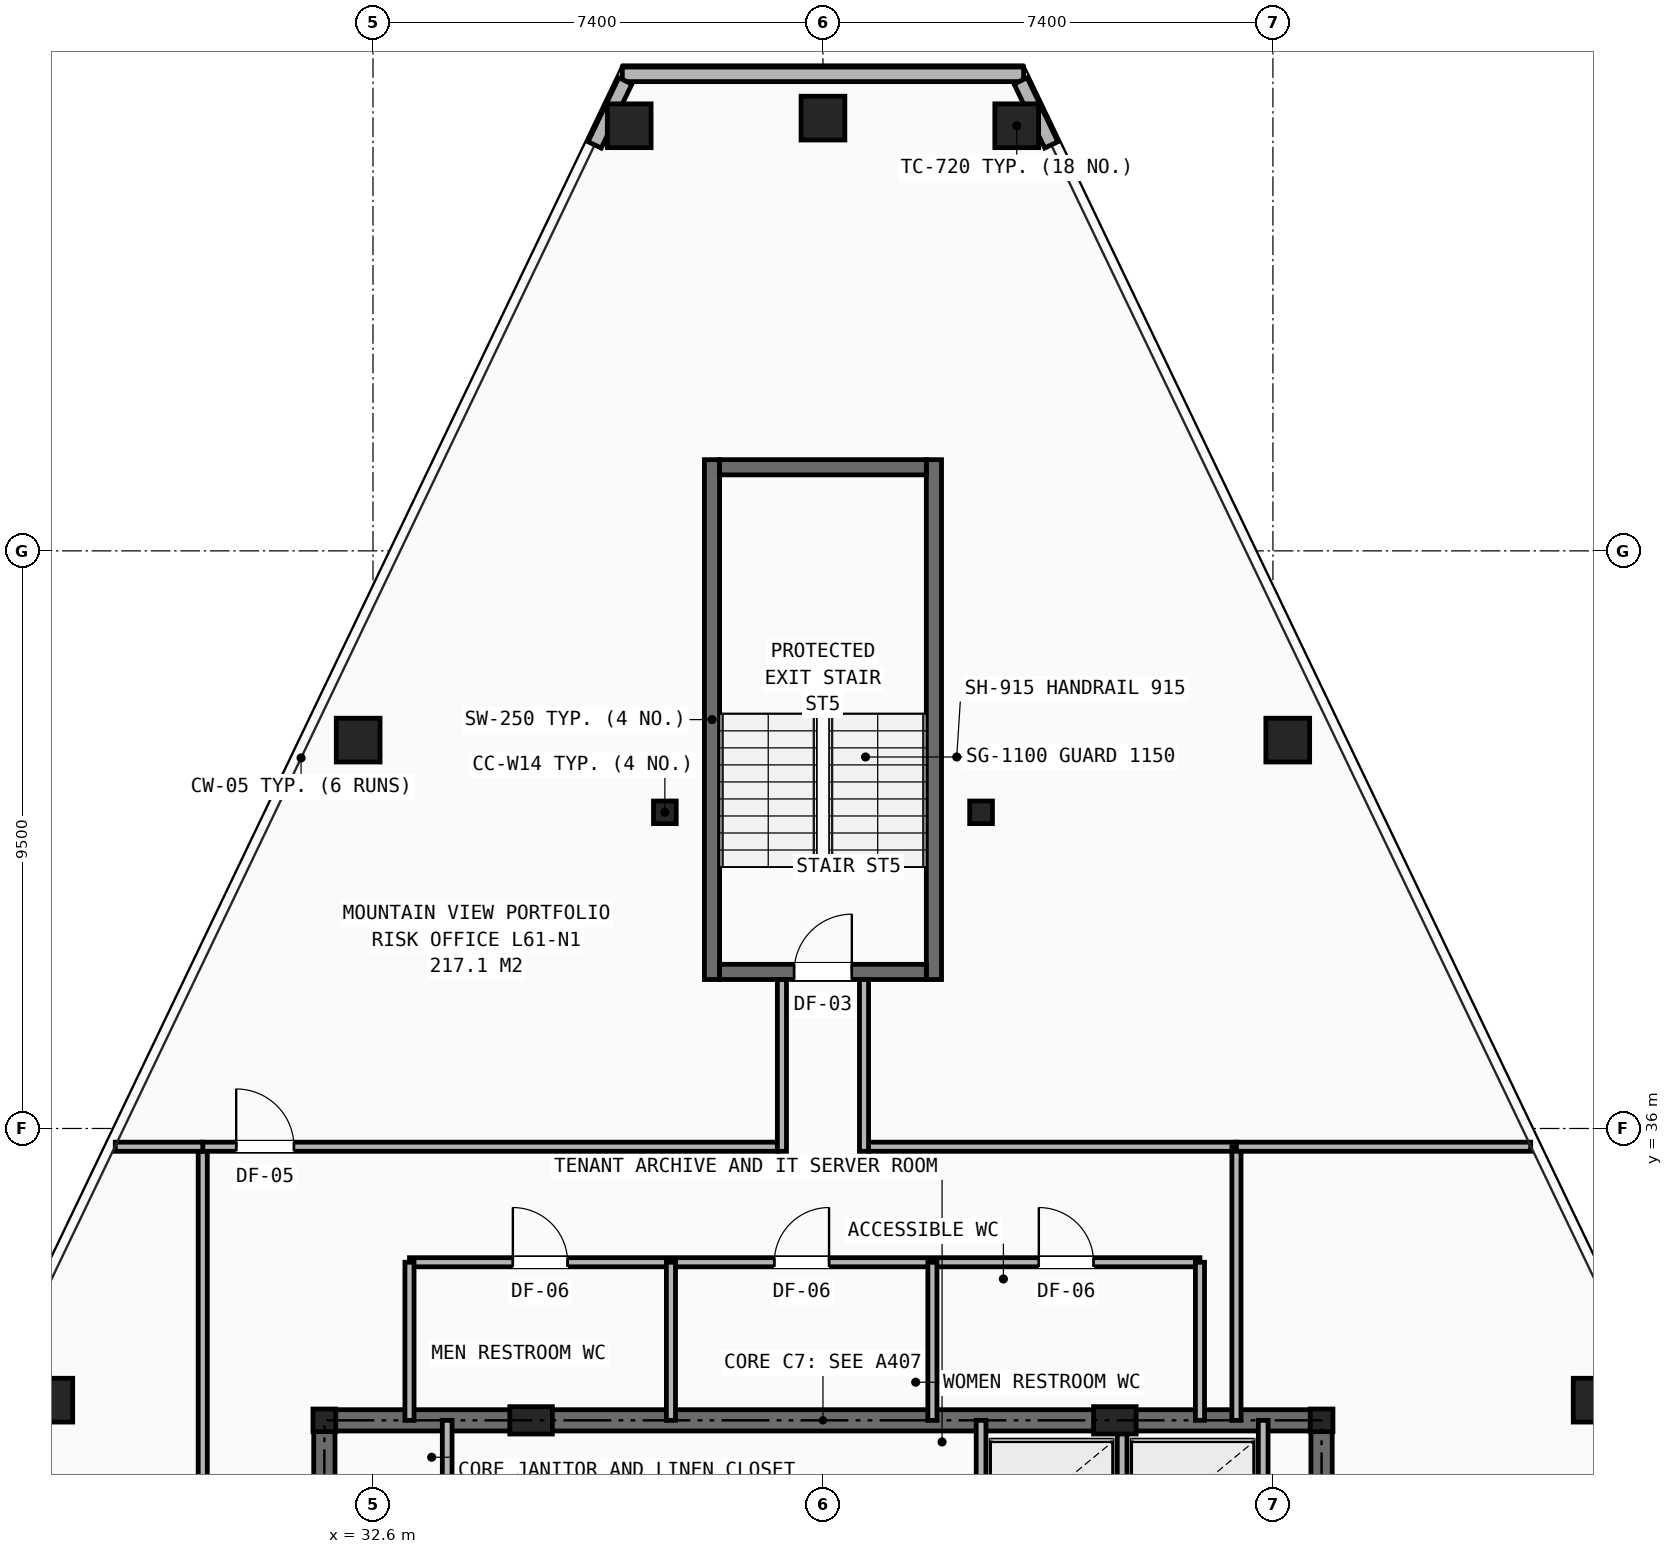
"""IFC4 building model, lengths in metres.
Left out: names, types, materials, properties, quantities, classifications, styles, units other than length and angle.
Written with IfcOpenShell. Run it as: python <this file> out.ifc"""

import sys

from ifc_helpers import new_model, si_unit, direction, frame, frame_2d, origin, origin_2d, place, context, subcontext, project, spatial, rectangle, hollow_rectangle, i_section, extrude, element, fill, save


model = new_model("IFC4")
c1 = context("Model", 3, precision=1e-05, world=origin(), true_north=direction((0.0, 1.0)))
c2 = subcontext(c1, "Body", "Model", "MODEL_VIEW")
j1 = project(units=[si_unit("LENGTHUNIT", "METRE"), si_unit("PLANEANGLEUNIT", "RADIAN")], contexts=[c1])
p1 = place(None, origin())
s1 = spatial("IfcSite", under=j1, at=p1, CompositionType="ELEMENT")
p2 = place(p1, origin())
s2 = spatial("IfcBuilding", under=s1, at=p2, CompositionType="ELEMENT")
p3 = place(p2, frame((0.0, 0.0, 215.4)))
s3 = spatial("IfcBuildingStorey", under=s2, at=p3, CompositionType="ELEMENT", Elevation=215.4)
for number, where, z_axis, x_axis in (
    (1, (31.8, 31.2, 0.0), (0.0, 0.0, 1.0), (1.0, 0.0, 0.0)),
    (2, (48.2, 31.2, 0.0), (0.0, 0.0, 1.0), (1.0, 0.0, 0.0)),
    (3, (37.4, 41.2, 0.0), (0.0, 0.0, 1.0), (1.0, 0.0, 0.0)),
    (4, (42.6, 41.2, 0.0), (0.0, 0.0, 1.0), (1.0, 0.0, 0.0)),
):
    element("IfcColumn", number, at=place(p3, frame(where, z_axis=z_axis, x_axis=x_axis)), inside=s3, PredefinedType="COLUMN", context=c2, shape_type="SweptSolid", body=[
        extrude(i_section(OverallWidth=0.374, OverallDepth=0.372, WebThickness=0.016, FlangeThickness=0.026, at=origin_2d()), origin(), (0.0, 0.0, 1.0), 3.5),
    ])
for number, where, z_axis, x_axis in (
    (5, (35.2, 31.2, 0.0), (0.0, 0.0, 1.0), (1.0, 0.0, 0.0)),
    (6, (44.8, 31.2, 0.0), (0.0, 0.0, 1.0), (1.0, 0.0, 0.0)),
):
    element("IfcColumn", number, at=place(p3, frame(where, z_axis=z_axis, x_axis=x_axis)), inside=s3, PredefinedType="PILASTER", context=c2, shape_type="SweptSolid", body=[
        extrude(rectangle(XDim=0.7, YDim=0.45, at=origin_2d()), origin(), (0.0, 0.0, 1.0), 3.5),
    ])
for number, where, z_axis, x_axis in (
    (7, (43.187, 52.492, 0.0), (0.0, 0.0, 1.0), (1.0, 0.0, 0.0)),
    (8, (40.0, 52.617, 0.0), (0.0, 0.0, 1.0), (1.0, 0.0, 0.0)),
    (9, (36.813, 52.492, 0.0), (0.0, 0.0, 1.0), (1.0, 0.0, 0.0)),
    (10, (32.356, 42.388, 0.0), (0.0, 0.0, 1.0), (1.0, 0.0, 0.0)),
    (11, (27.301, 31.532, 0.0), (0.0, 0.0, 1.0), (1.0, 0.0, 0.0)),
    (12, (52.699, 31.532, 0.0), (0.0, 0.0, 1.0), (1.0, 0.0, 0.0)),
    (13, (47.644, 42.388, 0.0), (0.0, 0.0, 1.0), (1.0, 0.0, 0.0)),
):
    element("IfcColumn", number, at=place(p3, frame(where, z_axis=z_axis, x_axis=x_axis)), inside=s3, PredefinedType="COLUMN", context=c2, shape_type="SweptSolid", body=[
        extrude(hollow_rectangle(XDim=0.72, YDim=0.72, WallThickness=0.05, at=origin_2d()), origin(), (0.0, 0.0, 1.0), 3.5),
    ])
p4 = place(p3, frame((36.7, 53.337, 0.0), z_axis=(0.0, 0.0, 1.0), x_axis=(1.0, 0.0, 0.0)))
e14 = element("IfcWall", 14, at=p4, inside=s3, PredefinedType="SHEAR", context=c2, shape_type="SweptSolid", body=[
    extrude(rectangle(XDim=6.6, YDim=0.24, at=frame_2d((3.3, 0.0))), origin(), (0.0, 0.0, 1.0), 2.623),
])
for number, where, z_axis, x_axis in (
    (15, (36.749, 53.23, 0.0), (0.0, 0.0, 1.0), (-0.432, -0.902, 0.0)),
    (16, (43.755, 52.177, 0.0), (0.0, 0.0, 1.0), (-0.432, 0.902, 0.0)),
):
    element("IfcWall", number, at=place(p3, frame(where, z_axis=z_axis, x_axis=x_axis)), inside=s3, PredefinedType="SHEAR", context=c2, shape_type="SweptSolid", body=[
        extrude(rectangle(XDim=1.167, YDim=0.24, at=frame_2d((0.584, 0.0))), origin(), (0.0, 0.0, 1.0), 2.623),
    ])
p5 = place(p3, frame((31.8, 31.2, 0.0), z_axis=(0.0, 0.0, 1.0), x_axis=(1.0, 0.0, 0.0)))
e17 = element("IfcWall", 17, at=p5, inside=s3, PredefinedType="SHEAR", context=c2, shape_type="SweptSolid", body=[
    extrude(rectangle(XDim=16.4, YDim=0.35, at=frame_2d((8.2, 0.0))), origin(), (0.0, 0.0, 1.0), 3.25),
])
p6 = place(p3, frame((31.8, 16.4, 0.0), z_axis=(0.0, 0.0, 1.0), x_axis=(0.0, 1.0, 0.0)))
e18 = element("IfcWall", 18, at=p6, inside=s3, PredefinedType="SHEAR", context=c2, shape_type="SweptSolid", body=[
    extrude(rectangle(XDim=14.8, YDim=0.35, at=frame_2d((7.4, 0.0))), origin(), (0.0, 0.0, 1.0), 3.25),
])
p7 = place(p6, frame((11.0, 0.0, 0.0)))
e19 = element("IfcOpeningElement", 19, at=p7, cuts=e18, PredefinedType="OPENING", context=c2, shape_type="SweptSolid", body=[
    extrude(rectangle(XDim=1.1, YDim=2.15, at=frame_2d((0.55, 1.075))), frame((0.0, 0.185, 0.0), z_axis=(0.0, -1.0, 0.0), x_axis=(1.0, 0.0, 0.0)), (0.0, 0.0, 1.0), 0.37),
])
p8 = place(p3, frame((48.2, 16.4, 0.0), z_axis=(0.0, 0.0, 1.0), x_axis=(0.0, 1.0, 0.0)))
e20 = element("IfcWall", 20, at=p8, inside=s3, PredefinedType="SHEAR", context=c2, shape_type="SweptSolid", body=[
    extrude(rectangle(XDim=14.8, YDim=0.35, at=frame_2d((7.4, 0.0))), origin(), (0.0, 0.0, 1.0), 3.25),
])
p9 = place(p8, frame((11.0, 0.0, 0.0)))
e21 = element("IfcOpeningElement", 21, at=p9, cuts=e20, PredefinedType="OPENING", context=c2, shape_type="SweptSolid", body=[
    extrude(rectangle(XDim=1.1, YDim=2.15, at=frame_2d((0.55, 1.075))), frame((0.0, 0.185, 0.0), z_axis=(0.0, -1.0, 0.0), x_axis=(1.0, 0.0, 0.0)), (0.0, 0.0, 1.0), 0.37),
])
for number, where, z_axis, x_axis in (
    (22, (33.82, 29.02, 0.0), (0.0, 0.0, 1.0), (0.0, 1.0, 0.0)),
    (23, (42.6, 29.02, 0.0), (0.0, 0.0, 1.0), (0.0, 1.0, 0.0)),
    (24, (44.92, 29.02, 0.0), (0.0, 0.0, 1.0), (0.0, 1.0, 0.0)),
    (25, (47.24, 29.02, 0.0), (0.0, 0.0, 1.0), (0.0, 1.0, 0.0)),
):
    element("IfcWall", number, at=place(p3, frame(where, z_axis=z_axis, x_axis=x_axis)), inside=s3, PredefinedType="SOLIDWALL", context=c2, shape_type="SweptSolid", body=[
        extrude(rectangle(XDim=2.18, YDim=0.16, at=frame_2d((1.09, 0.0))), origin(), (0.0, 0.0, 1.0), 2.705),
    ])
p10 = place(p3, frame((33.2, 33.8, 0.0), z_axis=(0.0, 0.0, 1.0), x_axis=(1.0, 0.0, 0.0)))
e26 = element("IfcWall", 26, at=p10, inside=s3, PredefinedType="PARTITIONING", context=c2, shape_type="SweptSolid", body=[
    extrude(rectangle(XDim=13.0, YDim=0.15, at=frame_2d((6.5, 0.0))), origin(), (0.0, 0.0, 1.0), 3.25),
])
p11 = place(p10, frame((1.7, 0.0, 0.0)))
e27 = element("IfcOpeningElement", 27, at=p11, cuts=e26, PredefinedType="OPENING", context=c2, shape_type="SweptSolid", body=[
    extrude(rectangle(XDim=0.9, YDim=2.1, at=frame_2d((0.45, 1.05))), frame((0.0, 0.085, 0.0), z_axis=(0.0, -1.0, 0.0), x_axis=(1.0, 0.0, 0.0)), (0.0, 0.0, 1.0), 0.17),
])
p12 = place(p10, frame((6.0, 0.0, 0.0)))
e28 = element("IfcOpeningElement", 28, at=p12, cuts=e26, PredefinedType="OPENING", context=c2, shape_type="SweptSolid", body=[
    extrude(rectangle(XDim=0.9, YDim=2.1, at=frame_2d((0.45, 1.05))), frame((0.0, 0.085, 0.0), z_axis=(0.0, -1.0, 0.0), x_axis=(1.0, 0.0, 0.0)), (0.0, 0.0, 1.0), 0.17),
])
p13 = place(p10, frame((10.35, 0.0, 0.0)))
e29 = element("IfcOpeningElement", 29, at=p13, cuts=e26, PredefinedType="OPENING", context=c2, shape_type="SweptSolid", body=[
    extrude(rectangle(XDim=0.9, YDim=2.1, at=frame_2d((0.45, 1.05))), frame((0.0, 0.085, 0.0), z_axis=(0.0, -1.0, 0.0), x_axis=(1.0, 0.0, 0.0)), (0.0, 0.0, 1.0), 0.17),
])
for number, where, z_axis, x_axis in (
    (30, (33.2, 31.2, 0.0), (0.0, 0.0, 1.0), (0.0, 1.0, 0.0)),
    (31, (46.2, 31.2, 0.0), (0.0, 0.0, 1.0), (0.0, 1.0, 0.0)),
    (32, (37.5, 31.2, 0.0), (0.0, 0.0, 1.0), (0.0, 1.0, 0.0)),
    (33, (41.8, 31.2, 0.0), (0.0, 0.0, 1.0), (0.0, 1.0, 0.0)),
):
    element("IfcWall", number, at=place(p3, frame(where, z_axis=z_axis, x_axis=x_axis)), inside=s3, PredefinedType="PARTITIONING", context=c2, shape_type="SweptSolid", body=[
        extrude(rectangle(XDim=2.6, YDim=0.15, at=frame_2d((1.3, 0.0))), origin(), (0.0, 0.0, 1.0), 2.705),
    ])
p14 = place(p3, frame((29.8, 16.4, 0.0), z_axis=(0.0, 0.0, 1.0), x_axis=(0.0, 1.0, 0.0)))
e34 = element("IfcWall", 34, at=p14, inside=s3, PredefinedType="PARTITIONING", context=c2, shape_type="SweptSolid", body=[
    extrude(rectangle(XDim=19.3, YDim=0.15, at=frame_2d((9.65, 0.0))), origin(), (0.0, 0.0, 1.0), 2.292),
])
p15 = place(p14, frame((0.35, 0.0, 0.0)))
e35 = element("IfcOpeningElement", 35, at=p15, cuts=e34, PredefinedType="OPENING", context=c2, shape_type="SweptSolid", body=[
    extrude(rectangle(XDim=0.95, YDim=2.1, at=frame_2d((0.475, 1.05))), frame((0.0, 0.085, 0.0), z_axis=(0.0, -1.0, 0.0), x_axis=(1.0, 0.0, 0.0)), (0.0, 0.0, 1.0), 0.17),
])
p16 = place(p14, frame((10.45, 0.0, 0.0)))
e36 = element("IfcOpeningElement", 36, at=p16, cuts=e34, PredefinedType="OPENING", context=c2, shape_type="SweptSolid", body=[
    extrude(rectangle(XDim=0.95, YDim=2.1, at=frame_2d((0.475, 1.05))), frame((0.0, 0.085, 0.0), z_axis=(0.0, -1.0, 0.0), x_axis=(1.0, 0.0, 0.0)), (0.0, 0.0, 1.0), 0.17),
])
p17 = place(p3, frame((29.8, 35.7, 0.0), z_axis=(0.0, 0.0, 1.0), x_axis=(1.0, 0.0, 0.0)))
e37 = element("IfcWall", 37, at=p17, inside=s3, PredefinedType="PARTITIONING", context=c2, shape_type="SweptSolid", body=[
    extrude(rectangle(XDim=9.45, YDim=0.15, at=frame_2d((4.725, 0.0))), origin(), (0.0, 0.0, 1.0), 2.833),
])
p18 = place(p17, frame((0.55, 0.0, 0.0)))
e38 = element("IfcOpeningElement", 38, at=p18, cuts=e37, PredefinedType="OPENING", context=c2, shape_type="SweptSolid", body=[
    extrude(rectangle(XDim=0.95, YDim=2.1, at=frame_2d((0.475, 1.05))), frame((0.0, 0.085, 0.0), z_axis=(0.0, -1.0, 0.0), x_axis=(1.0, 0.0, 0.0)), (0.0, 0.0, 1.0), 0.17),
])
p19 = place(p3, frame((40.75, 35.7, 0.0), z_axis=(0.0, 0.0, 1.0), x_axis=(1.0, 0.0, 0.0)))
e39 = element("IfcWall", 39, at=p19, inside=s3, PredefinedType="PARTITIONING", context=c2, shape_type="SweptSolid", body=[
    extrude(rectangle(XDim=6.05, YDim=0.15, at=frame_2d((3.025, 0.0))), origin(), (0.0, 0.0, 1.0), 3.25),
])
p20 = place(p3, frame((46.8, 31.2, 0.0), z_axis=(0.0, 0.0, 1.0), x_axis=(0.0, 1.0, 0.0)))
e40 = element("IfcWall", 40, at=p20, inside=s3, PredefinedType="PARTITIONING", context=c2, shape_type="SweptSolid", body=[
    extrude(rectangle(XDim=4.5, YDim=0.15, at=frame_2d((2.25, 0.0))), origin(), (0.0, 0.0, 1.0), 2.705),
])
p21 = place(p3, frame((28.361, 35.7, 0.0), z_axis=(0.0, 0.0, 1.0), x_axis=(1.0, 0.0, 0.0)))
e41 = element("IfcWall", 41, at=p21, inside=s3, PredefinedType="PARTITIONING", context=c2, shape_type="SweptSolid", body=[
    extrude(rectangle(XDim=1.439, YDim=0.15, at=frame_2d((0.719, 0.0))), origin(), (0.0, 0.0, 1.0), 2.628),
])
p22 = place(p3, frame((46.8, 35.7, 0.0), z_axis=(0.0, 0.0, 1.0), x_axis=(1.0, 0.0, 0.0)))
e42 = element("IfcWall", 42, at=p22, inside=s3, PredefinedType="PARTITIONING", context=c2, shape_type="SweptSolid", body=[
    extrude(rectangle(XDim=4.839, YDim=0.15, at=frame_2d((2.419, 0.0))), origin(), (0.0, 0.0, 1.0), 2.628),
])
for number, where, z_axis, x_axis in (
    (43, (38.175, 38.45, 0.0), (0.0, 0.0, 1.0), (0.0, 1.0, 0.0)),
    (44, (41.825, 38.45, 0.0), (0.0, 0.0, 1.0), (0.0, 1.0, 0.0)),
):
    element("IfcWall", number, at=place(p3, frame(where, z_axis=z_axis, x_axis=x_axis)), inside=s3, PredefinedType="SHEAR", context=c2, shape_type="SweptSolid", body=[
        extrude(rectangle(XDim=8.55, YDim=0.25, at=frame_2d((4.275, 0.0))), origin(), (0.0, 0.0, 1.0), 3.25),
    ])
p23 = place(p3, frame((38.3, 38.575, 0.0), z_axis=(0.0, 0.0, 1.0), x_axis=(1.0, 0.0, 0.0)))
e45 = element("IfcWall", 45, at=p23, inside=s3, PredefinedType="SHEAR", context=c2, shape_type="SweptSolid", body=[
    extrude(rectangle(XDim=3.4, YDim=0.25, at=frame_2d((1.7, 0.0))), origin(), (0.0, 0.0, 1.0), 3.25),
])
p24 = place(p23, frame((1.225, 0.0, 0.0)))
e46 = element("IfcOpeningElement", 46, at=p24, cuts=e45, PredefinedType="OPENING", context=c2, shape_type="SweptSolid", body=[
    extrude(rectangle(XDim=0.95, YDim=2.1, at=frame_2d((0.475, 1.05))), frame((0.0, 0.135, 0.0), z_axis=(0.0, -1.0, 0.0), x_axis=(1.0, 0.0, 0.0)), (0.0, 0.0, 1.0), 0.27),
])
p25 = place(p3, frame((38.3, 46.875, 0.0), z_axis=(0.0, 0.0, 1.0), x_axis=(1.0, 0.0, 0.0)))
e47 = element("IfcWall", 47, at=p25, inside=s3, PredefinedType="SHEAR", context=c2, shape_type="SweptSolid", body=[
    extrude(rectangle(XDim=3.4, YDim=0.25, at=frame_2d((1.7, 0.0))), origin(), (0.0, 0.0, 1.0), 3.25),
])
for number, where, z_axis, x_axis in (
    (48, (39.325, 35.625, 0.0), (0.0, 0.0, 1.0), (0.0, 1.0, 0.0)),
    (49, (40.675, 35.625, 0.0), (0.0, 0.0, 1.0), (0.0, 1.0, 0.0)),
):
    element("IfcWall", number, at=place(p3, frame(where, z_axis=z_axis, x_axis=x_axis)), inside=s3, PredefinedType="PARTITIONING", context=c2, shape_type="SweptSolid", body=[
        extrude(rectangle(XDim=2.825, YDim=0.15, at=frame_2d((1.413, 0.0))), origin(), (0.0, 0.0, 1.0), 3.25),
    ])
p26 = place(p11, origin())
e50 = element("IfcDoor", 50, at=p26, inside=s3, OperationType="SINGLE_SWING_LEFT", PredefinedType="DOOR", context=c2, shape_type="SweptSolid", body=[
    extrude(rectangle(XDim=0.9, YDim=2.1, at=frame_2d((0.45, 1.05))), frame((0.0, 0.025, 0.0), z_axis=(0.0, -1.0, 0.0), x_axis=(1.0, 0.0, 0.0)), (0.0, 0.0, 1.0), 0.05),
])
fill(e27, e50)
p27 = place(p12, origin())
e51 = element("IfcDoor", 51, at=p27, inside=s3, OperationType="SINGLE_SWING_RIGHT", PredefinedType="DOOR", context=c2, shape_type="SweptSolid", body=[
    extrude(rectangle(XDim=0.9, YDim=2.1, at=frame_2d((0.45, 1.05))), frame((0.0, 0.025, 0.0), z_axis=(0.0, -1.0, 0.0), x_axis=(1.0, 0.0, 0.0)), (0.0, 0.0, 1.0), 0.05),
])
fill(e28, e51)
p28 = place(p13, origin())
e52 = element("IfcDoor", 52, at=p28, inside=s3, OperationType="SINGLE_SWING_LEFT", PredefinedType="DOOR", context=c2, shape_type="SweptSolid", body=[
    extrude(rectangle(XDim=0.9, YDim=2.1, at=frame_2d((0.45, 1.05))), frame((0.0, 0.025, 0.0), z_axis=(0.0, -1.0, 0.0), x_axis=(1.0, 0.0, 0.0)), (0.0, 0.0, 1.0), 0.05),
])
fill(e29, e52)
p29 = place(p18, origin())
e53 = element("IfcDoor", 53, at=p29, inside=s3, OperationType="SINGLE_SWING_LEFT", PredefinedType="DOOR", context=c2, shape_type="SweptSolid", body=[
    extrude(rectangle(XDim=0.95, YDim=2.1, at=frame_2d((0.475, 1.05))), frame((0.0, 0.025, 0.0), z_axis=(0.0, -1.0, 0.0), x_axis=(1.0, 0.0, 0.0)), (0.0, 0.0, 1.0), 0.05),
])
fill(e38, e53)
p30 = place(p24, origin())
e54 = element("IfcDoor", 54, at=p30, inside=s3, OperationType="SINGLE_SWING_RIGHT", PredefinedType="DOOR", context=c2, shape_type="SweptSolid", body=[
    extrude(rectangle(XDim=0.95, YDim=2.1, at=frame_2d((0.475, 1.05))), frame((0.0, 0.025, 0.0), z_axis=(0.0, -1.0, 0.0), x_axis=(1.0, 0.0, 0.0)), (0.0, 0.0, 1.0), 0.05),
])
fill(e46, e54)
save(model, sys.argv[1])
